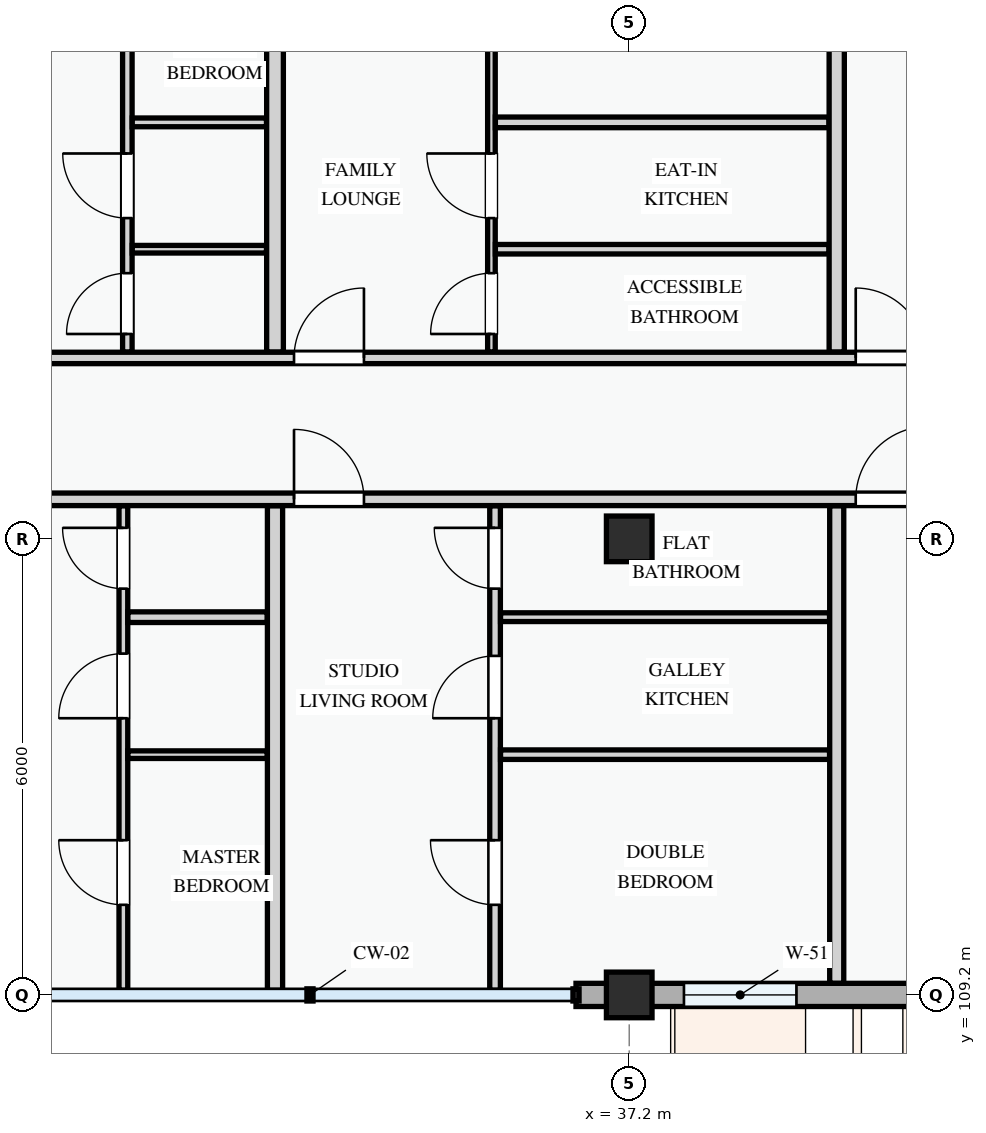
"""IFC4 building model, lengths in metres.
Left out: names, types, materials, properties, quantities, classifications, styles, units other than length and angle.
Written with IfcOpenShell. Run it as: python <this file> out.ifc"""

import sys

from ifc_helpers import new_model, si_unit, direction, frame, frame_2d, origin, origin_2d, place, context, subcontext, project, spatial, rectangle, extrude, element, fill, save


model = new_model("IFC4")
c1 = context("Model", 3, precision=1e-05, world=origin(), true_north=direction((0.0, 1.0)))
c2 = subcontext(c1, "Body", "Model", "MODEL_VIEW")
j1 = project(units=[si_unit("LENGTHUNIT", "METRE"), si_unit("PLANEANGLEUNIT", "RADIAN")], contexts=[c1])
p1 = place(None, origin())
s1 = spatial("IfcSite", under=j1, at=p1, CompositionType="ELEMENT")
p2 = place(p1, origin())
s2 = spatial("IfcBuilding", under=s1, at=p2, CompositionType="ELEMENT")
p3 = place(p2, frame((0.0, 0.0, 24.6)))
s3 = spatial("IfcBuildingStorey", under=s2, at=p3, CompositionType="ELEMENT", Elevation=24.6)
for number, where, z_axis, x_axis in (
    (1, (37.2, 109.2, 0.0), (0.0, 0.0, 1.0), (1.0, 0.0, 0.0)),
    (2, (37.2, 115.2, 0.0), (0.0, 0.0, 1.0), (1.0, 0.0, 0.0)),
):
    element("IfcColumn", number, at=place(p3, frame(where, z_axis=z_axis, x_axis=x_axis)), inside=s3, PredefinedType="COLUMN", context=c2, shape_type="SweptSolid", body=[
        extrude(rectangle(XDim=0.6, YDim=0.6, at=origin_2d()), origin(), (0.0, 0.0, 1.0), 3.3),
    ])
p4 = place(p3, frame((36.5, 109.2, 0.0), z_axis=(0.0, 0.0, 1.0), x_axis=(1.0, 0.0, 0.0)))
e3 = element("IfcWall", 3, at=p4, inside=s3, PredefinedType="STANDARD", context=c2, shape_type="SweptSolid", body=[
    extrude(rectangle(XDim=0.7, YDim=0.305, at=frame_2d((0.35, 0.0))), origin(), (0.0, 0.0, 1.0), 2.375),
])
p5 = place(p3, frame((37.2, 109.2, 0.0), z_axis=(0.0, 0.0, 1.0), x_axis=(1.0, 0.0, 0.0)))
e4 = element("IfcWall", 4, at=p5, inside=s3, PredefinedType="STANDARD", context=c2, shape_type="SweptSolid", body=[
    extrude(rectangle(XDim=6.0, YDim=0.305, at=frame_2d((3.0, 0.0))), origin(), (0.0, 0.0, 1.0), 2.475),
])
p6 = place(p5, frame((0.72, 0.0, 0.78)))
e5 = element("IfcOpeningElement", 5, at=p6, cuts=e4, PredefinedType="OPENING", context=c2, shape_type="SweptSolid", body=[
    extrude(rectangle(XDim=1.48, YDim=1.52, at=frame_2d((0.74, 0.76))), frame((0.0, 0.163, 0.0), z_axis=(0.0, -1.0, 0.0), x_axis=(1.0, 0.0, 0.0)), (0.0, 0.0, 1.0), 0.325),
])
p7 = place(p5, frame((3.72, 0.0, 0.78)))
e6 = element("IfcOpeningElement", 6, at=p7, cuts=e4, PredefinedType="OPENING", context=c2, shape_type="SweptSolid", body=[
    extrude(rectangle(XDim=1.1, YDim=1.3, at=frame_2d((0.55, 0.65))), frame((0.0, 0.163, 0.0), z_axis=(0.0, -1.0, 0.0), x_axis=(1.0, 0.0, 0.0)), (0.0, 0.0, 1.0), 0.325),
])
p8 = place(p3, frame((30.545, 109.26, 0.0), z_axis=(0.0, 0.0, 1.0), x_axis=(0.0, 1.0, 0.0)))
e7 = element("IfcWall", 7, at=p8, inside=s3, PredefinedType="PARTITIONING", context=c2, shape_type="SweptSolid", body=[
    extrude(rectangle(XDim=6.375, YDim=0.115, at=frame_2d((3.188, 0.0))), origin(), (0.0, 0.0, 1.0), 3.0),
])
p9 = place(p8, frame((1.125, 0.0, 0.0)))
e8 = element("IfcOpeningElement", 8, at=p9, cuts=e7, PredefinedType="OPENING", context=c2, shape_type="SweptSolid", body=[
    extrude(rectangle(XDim=0.85, YDim=2.1, at=frame_2d((0.425, 1.05))), frame((0.0, 0.067, 0.0), z_axis=(0.0, -1.0, 0.0), x_axis=(1.0, 0.0, 0.0)), (0.0, 0.0, 1.0), 0.135),
])
p10 = place(p8, frame((3.58, 0.0, 0.0)))
e9 = element("IfcOpeningElement", 9, at=p10, cuts=e7, PredefinedType="OPENING", context=c2, shape_type="SweptSolid", body=[
    extrude(rectangle(XDim=0.85, YDim=2.1, at=frame_2d((0.425, 1.05))), frame((0.0, 0.067, 0.0), z_axis=(0.0, -1.0, 0.0), x_axis=(1.0, 0.0, 0.0)), (0.0, 0.0, 1.0), 0.135),
])
p11 = place(p8, frame((5.285, 0.0, 0.0)))
e10 = element("IfcOpeningElement", 10, at=p11, cuts=e7, PredefinedType="OPENING", context=c2, shape_type="SweptSolid", body=[
    extrude(rectangle(XDim=0.8, YDim=2.1, at=frame_2d((0.4, 1.05))), frame((0.0, 0.067, 0.0), z_axis=(0.0, -1.0, 0.0), x_axis=(1.0, 0.0, 0.0)), (0.0, 0.0, 1.0), 0.135),
])
p12 = place(p3, frame((30.604, 112.361, 0.0), z_axis=(0.0, 0.0, 1.0), x_axis=(1.0, 0.0, 0.0)))
e11 = element("IfcWall", 11, at=p12, inside=s3, PredefinedType="PARTITIONING", context=c2, shape_type="SweptSolid", body=[
    extrude(rectangle(XDim=1.833, YDim=0.1, at=frame_2d((0.917, 0.0))), origin(), (0.0, 0.0, 1.0), 3.0),
])
p13 = place(p3, frame((30.604, 114.17, 0.0), z_axis=(0.0, 0.0, 1.0), x_axis=(1.0, 0.0, 0.0)))
e12 = element("IfcWall", 12, at=p13, inside=s3, PredefinedType="PARTITIONING", context=c2, shape_type="SweptSolid", body=[
    extrude(rectangle(XDim=1.833, YDim=0.14, at=frame_2d((0.917, 0.0))), origin(), (0.0, 0.0, 1.0), 3.0),
])
p14 = place(p3, frame((30.597, 117.657, 0.0), z_axis=(0.0, 0.0, 1.0), x_axis=(0.0, 1.0, 0.0)))
e13 = element("IfcWall", 13, at=p14, inside=s3, PredefinedType="PARTITIONING", context=c2, shape_type="SweptSolid", body=[
    extrude(rectangle(XDim=5.789, YDim=0.125, at=frame_2d((2.894, 0.0))), origin(), (0.0, 0.0, 1.0), 3.0),
])
p15 = place(p14, frame((0.238, 0.0, 0.0)))
e14 = element("IfcOpeningElement", 14, at=p15, cuts=e13, PredefinedType="OPENING", context=c2, shape_type="SweptSolid", body=[
    extrude(rectangle(XDim=0.8, YDim=2.1, at=frame_2d((0.4, 1.05))), frame((0.0, 0.073, 0.0), z_axis=(0.0, -1.0, 0.0), x_axis=(1.0, 0.0, 0.0)), (0.0, 0.0, 1.0), 0.145),
])
p16 = place(p14, frame((1.763, 0.0, 0.0)))
e15 = element("IfcOpeningElement", 15, at=p16, cuts=e13, PredefinedType="OPENING", context=c2, shape_type="SweptSolid", body=[
    extrude(rectangle(XDim=0.85, YDim=2.1, at=frame_2d((0.425, 1.05))), frame((0.0, 0.073, 0.0), z_axis=(0.0, -1.0, 0.0), x_axis=(1.0, 0.0, 0.0)), (0.0, 0.0, 1.0), 0.145),
])
p17 = place(p14, frame((4.028, 0.0, 0.0)))
e16 = element("IfcOpeningElement", 16, at=p17, cuts=e13, PredefinedType="OPENING", context=c2, shape_type="SweptSolid", body=[
    extrude(rectangle(XDim=0.85, YDim=2.1, at=frame_2d((0.425, 1.05))), frame((0.0, 0.073, 0.0), z_axis=(0.0, -1.0, 0.0), x_axis=(1.0, 0.0, 0.0)), (0.0, 0.0, 1.0), 0.145),
])
p18 = place(p3, frame((30.662, 120.679, 0.0), z_axis=(0.0, 0.0, 1.0), x_axis=(1.0, 0.0, 0.0)))
e17 = element("IfcWall", 17, at=p18, inside=s3, PredefinedType="PARTITIONING", context=c2, shape_type="SweptSolid", body=[
    extrude(rectangle(XDim=1.766, YDim=0.115, at=frame_2d((0.883, 0.0))), origin(), (0.0, 0.0, 1.0), 3.0),
])
p19 = place(p3, frame((30.662, 119.01, 0.0), z_axis=(0.0, 0.0, 1.0), x_axis=(1.0, 0.0, 0.0)))
e18 = element("IfcWall", 18, at=p19, inside=s3, PredefinedType="PARTITIONING", context=c2, shape_type="SweptSolid", body=[
    extrude(rectangle(XDim=1.766, YDim=0.1, at=frame_2d((0.883, 0.0))), origin(), (0.0, 0.0, 1.0), 3.0),
])
p20 = place(p3, frame((35.435, 109.26, 0.0), z_axis=(0.0, 0.0, 1.0), x_axis=(0.0, 1.0, 0.0)))
e19 = element("IfcWall", 19, at=p20, inside=s3, PredefinedType="PARTITIONING", context=c2, shape_type="SweptSolid", body=[
    extrude(rectangle(XDim=6.375, YDim=0.14, at=frame_2d((3.188, 0.0))), origin(), (0.0, 0.0, 1.0), 3.0),
])
p21 = place(p20, frame((1.125, 0.0, 0.0)))
e20 = element("IfcOpeningElement", 20, at=p21, cuts=e19, PredefinedType="OPENING", context=c2, shape_type="SweptSolid", body=[
    extrude(rectangle(XDim=0.85, YDim=2.1, at=frame_2d((0.425, 1.05))), frame((0.0, 0.08, 0.0), z_axis=(0.0, -1.0, 0.0), x_axis=(1.0, 0.0, 0.0)), (0.0, 0.0, 1.0), 0.16),
])
p22 = place(p20, frame((3.58, 0.0, 0.0)))
e21 = element("IfcOpeningElement", 21, at=p22, cuts=e19, PredefinedType="OPENING", context=c2, shape_type="SweptSolid", body=[
    extrude(rectangle(XDim=0.82, YDim=2.08, at=frame_2d((0.41, 1.04))), frame((0.0, 0.08, 0.0), z_axis=(0.0, -1.0, 0.0), x_axis=(1.0, 0.0, 0.0)), (0.0, 0.0, 1.0), 0.16),
])
p23 = place(p20, frame((5.285, 0.0, 0.0)))
e22 = element("IfcOpeningElement", 22, at=p23, cuts=e19, PredefinedType="OPENING", context=c2, shape_type="SweptSolid", body=[
    extrude(rectangle(XDim=0.8, YDim=2.1, at=frame_2d((0.4, 1.05))), frame((0.0, 0.08, 0.0), z_axis=(0.0, -1.0, 0.0), x_axis=(1.0, 0.0, 0.0)), (0.0, 0.0, 1.0), 0.16),
])
p24 = place(p3, frame((35.507, 112.361, 0.0), z_axis=(0.0, 0.0, 1.0), x_axis=(1.0, 0.0, 0.0)))
e23 = element("IfcWall", 23, at=p24, inside=s3, PredefinedType="PARTITIONING", context=c2, shape_type="SweptSolid", body=[
    extrude(rectangle(XDim=4.328, YDim=0.125, at=frame_2d((2.164, 0.0))), origin(), (0.0, 0.0, 1.0), 3.0),
])
p25 = place(p3, frame((35.507, 114.17, 0.0), z_axis=(0.0, 0.0, 1.0), x_axis=(1.0, 0.0, 0.0)))
e24 = element("IfcWall", 24, at=p25, inside=s3, PredefinedType="PARTITIONING", context=c2, shape_type="SweptSolid", body=[
    extrude(rectangle(XDim=4.328, YDim=0.115, at=frame_2d((2.164, 0.0))), origin(), (0.0, 0.0, 1.0), 3.0),
])
p26 = place(p3, frame((35.387, 117.657, 0.0), z_axis=(0.0, 0.0, 1.0), x_axis=(0.0, 1.0, 0.0)))
e25 = element("IfcWall", 25, at=p26, inside=s3, PredefinedType="PARTITIONING", context=c2, shape_type="SweptSolid", body=[
    extrude(rectangle(XDim=5.789, YDim=0.1, at=frame_2d((2.894, 0.0))), origin(), (0.0, 0.0, 1.0), 3.0),
])
p27 = place(p26, frame((0.238, 0.0, 0.0)))
e26 = element("IfcOpeningElement", 26, at=p27, cuts=e25, PredefinedType="OPENING", context=c2, shape_type="SweptSolid", body=[
    extrude(rectangle(XDim=0.8, YDim=2.1, at=frame_2d((0.4, 1.05))), frame((0.0, 0.06, 0.0), z_axis=(0.0, -1.0, 0.0), x_axis=(1.0, 0.0, 0.0)), (0.0, 0.0, 1.0), 0.12),
])
p28 = place(p26, frame((1.763, 0.0, 0.0)))
e27 = element("IfcOpeningElement", 27, at=p28, cuts=e25, PredefinedType="OPENING", context=c2, shape_type="SweptSolid", body=[
    extrude(rectangle(XDim=0.85, YDim=2.1, at=frame_2d((0.425, 1.05))), frame((0.0, 0.06, 0.0), z_axis=(0.0, -1.0, 0.0), x_axis=(1.0, 0.0, 0.0)), (0.0, 0.0, 1.0), 0.12),
])
p29 = place(p26, frame((4.028, 0.0, 0.0)))
e28 = element("IfcOpeningElement", 28, at=p29, cuts=e25, PredefinedType="OPENING", context=c2, shape_type="SweptSolid", body=[
    extrude(rectangle(XDim=0.82, YDim=2.08, at=frame_2d((0.41, 1.04))), frame((0.0, 0.06, 0.0), z_axis=(0.0, -1.0, 0.0), x_axis=(1.0, 0.0, 0.0)), (0.0, 0.0, 1.0), 0.12),
])
p30 = place(p3, frame((35.439, 120.679, 0.0), z_axis=(0.0, 0.0, 1.0), x_axis=(1.0, 0.0, 0.0)))
e29 = element("IfcWall", 29, at=p30, inside=s3, PredefinedType="PARTITIONING", context=c2, shape_type="SweptSolid", body=[
    extrude(rectangle(XDim=4.389, YDim=0.14, at=frame_2d((2.194, 0.0))), origin(), (0.0, 0.0, 1.0), 3.0),
])
p31 = place(p3, frame((35.439, 119.01, 0.0), z_axis=(0.0, 0.0, 1.0), x_axis=(1.0, 0.0, 0.0)))
e30 = element("IfcWall", 30, at=p31, inside=s3, PredefinedType="PARTITIONING", context=c2, shape_type="SweptSolid", body=[
    extrude(rectangle(XDim=4.389, YDim=0.125, at=frame_2d((2.194, 0.0))), origin(), (0.0, 0.0, 1.0), 3.0),
])
p32 = place(p3, frame((32.54, 109.26, 0.0), z_axis=(0.0, 0.0, 1.0), x_axis=(0.0, 1.0, 0.0)))
e31 = element("IfcWall", 31, at=p32, inside=s3, PredefinedType="PARTITIONING", context=c2, shape_type="SweptSolid", body=[
    extrude(rectangle(XDim=6.375, YDim=0.2, at=frame_2d((3.188, 0.0))), origin(), (0.0, 0.0, 1.0), 3.0),
])
p33 = place(p3, frame((32.54, 117.657, 0.0), z_axis=(0.0, 0.0, 1.0), x_axis=(0.0, 1.0, 0.0)))
e32 = element("IfcWall", 32, at=p33, inside=s3, PredefinedType="PARTITIONING", context=c2, shape_type="SweptSolid", body=[
    extrude(rectangle(XDim=5.789, YDim=0.22, at=frame_2d((2.894, 0.0))), origin(), (0.0, 0.0, 1.0), 3.0),
])
p34 = place(p3, frame((39.93, 109.354, 0.0), z_axis=(0.0, 0.0, 1.0), x_axis=(0.0, 1.0, 0.0)))
e33 = element("IfcWall", 33, at=p34, inside=s3, PredefinedType="PARTITIONING", context=c2, shape_type="SweptSolid", body=[
    extrude(rectangle(XDim=6.281, YDim=0.185, at=frame_2d((3.141, 0.0))), origin(), (0.0, 0.0, 1.0), 3.0),
])
p35 = place(p3, frame((39.93, 117.657, 0.0), z_axis=(0.0, 0.0, 1.0), x_axis=(0.0, 1.0, 0.0)))
e34 = element("IfcWall", 34, at=p35, inside=s3, PredefinedType="PARTITIONING", context=c2, shape_type="SweptSolid", body=[
    extrude(rectangle(XDim=5.789, YDim=0.2, at=frame_2d((2.894, 0.0))), origin(), (0.0, 0.0, 1.0), 3.0),
])
p36 = place(p3, frame((25.15, 115.72, 0.0), z_axis=(0.0, 0.0, 1.0), x_axis=(1.0, 0.0, 0.0)))
e35 = element("IfcWall", 35, at=p36, inside=s3, PredefinedType="PARTITIONING", context=c2, shape_type="SweptSolid", body=[
    extrude(rectangle(XDim=26.296, YDim=0.165, at=frame_2d((13.148, 0.0))), origin(), (0.0, 0.0, 1.0), 3.0),
])
p37 = place(p36, frame((0.25, 0.0, 0.0)))
e36 = element("IfcOpeningElement", 36, at=p37, cuts=e35, PredefinedType="OPENING", context=c2, shape_type="SweptSolid", body=[
    extrude(rectangle(XDim=0.92, YDim=2.1, at=frame_2d((0.46, 1.05))), frame((0.0, 0.093, 0.0), z_axis=(0.0, -1.0, 0.0), x_axis=(1.0, 0.0, 0.0)), (0.0, 0.0, 1.0), 0.185),
])
p38 = place(p36, frame((7.64, 0.0, 0.0)))
e37 = element("IfcOpeningElement", 37, at=p38, cuts=e35, PredefinedType="OPENING", context=c2, shape_type="SweptSolid", body=[
    extrude(rectangle(XDim=0.92, YDim=2.1, at=frame_2d((0.46, 1.05))), frame((0.0, 0.093, 0.0), z_axis=(0.0, -1.0, 0.0), x_axis=(1.0, 0.0, 0.0)), (0.0, 0.0, 1.0), 0.185),
])
p39 = place(p36, frame((15.03, 0.0, 0.0)))
e38 = element("IfcOpeningElement", 38, at=p39, cuts=e35, PredefinedType="OPENING", context=c2, shape_type="SweptSolid", body=[
    extrude(rectangle(XDim=0.96, YDim=2.12, at=frame_2d((0.48, 1.06))), frame((0.0, 0.093, 0.0), z_axis=(0.0, -1.0, 0.0), x_axis=(1.0, 0.0, 0.0)), (0.0, 0.0, 1.0), 0.185),
])
p40 = place(p3, frame((22.66, 117.58, 0.0), z_axis=(0.0, 0.0, 1.0), x_axis=(1.0, 0.0, 0.0)))
e39 = element("IfcWall", 39, at=p40, inside=s3, PredefinedType="PARTITIONING", context=c2, shape_type="SweptSolid", body=[
    extrude(rectangle(XDim=28.88, YDim=0.15, at=frame_2d((14.44, 0.0))), origin(), (0.0, 0.0, 1.0), 3.0),
])
p41 = place(p40, frame((2.74, 0.0, 0.0)))
e40 = element("IfcOpeningElement", 40, at=p41, cuts=e39, PredefinedType="OPENING", context=c2, shape_type="SweptSolid", body=[
    extrude(rectangle(XDim=0.92, YDim=2.1, at=frame_2d((0.46, 1.05))), frame((0.0, 0.085, 0.0), z_axis=(0.0, -1.0, 0.0), x_axis=(1.0, 0.0, 0.0)), (0.0, 0.0, 1.0), 0.17),
])
p42 = place(p40, frame((10.13, 0.0, 0.0)))
e41 = element("IfcOpeningElement", 41, at=p42, cuts=e39, PredefinedType="OPENING", context=c2, shape_type="SweptSolid", body=[
    extrude(rectangle(XDim=0.92, YDim=2.1, at=frame_2d((0.46, 1.05))), frame((0.0, 0.085, 0.0), z_axis=(0.0, -1.0, 0.0), x_axis=(1.0, 0.0, 0.0)), (0.0, 0.0, 1.0), 0.17),
])
p43 = place(p40, frame((17.52, 0.0, 0.0)))
e42 = element("IfcOpeningElement", 42, at=p43, cuts=e39, PredefinedType="OPENING", context=c2, shape_type="SweptSolid", body=[
    extrude(rectangle(XDim=0.92, YDim=2.1, at=frame_2d((0.46, 1.05))), frame((0.0, 0.085, 0.0), z_axis=(0.0, -1.0, 0.0), x_axis=(1.0, 0.0, 0.0)), (0.0, 0.0, 1.0), 0.17),
])
p44 = place(p6, origin())
e43 = element("IfcWindow", 43, at=p44, inside=s3, PartitioningType="SINGLE_PANEL", PredefinedType="WINDOW", context=c2, shape_type="SweptSolid", body=[
    extrude(rectangle(XDim=1.48, YDim=1.52, at=frame_2d((0.74, 0.76))), frame((0.0, 0.03, 0.0), z_axis=(0.0, -1.0, 0.0), x_axis=(1.0, 0.0, 0.0)), (0.0, 0.0, 1.0), 0.06),
])
fill(e5, e43)
p45 = place(p9, origin())
e44 = element("IfcDoor", 44, at=p45, inside=s3, OperationType="SINGLE_SWING_RIGHT", PredefinedType="DOOR", context=c2, shape_type="SweptSolid", body=[
    extrude(rectangle(XDim=0.85, YDim=2.1, at=frame_2d((0.425, 1.05))), frame((0.0, 0.025, 0.0), z_axis=(0.0, -1.0, 0.0), x_axis=(1.0, 0.0, 0.0)), (0.0, 0.0, 1.0), 0.05),
])
fill(e8, e44)
p46 = place(p10, origin())
e45 = element("IfcDoor", 45, at=p46, inside=s3, OperationType="SINGLE_SWING_LEFT", PredefinedType="DOOR", context=c2, shape_type="SweptSolid", body=[
    extrude(rectangle(XDim=0.85, YDim=2.1, at=frame_2d((0.425, 1.05))), frame((0.0, 0.025, 0.0), z_axis=(0.0, -1.0, 0.0), x_axis=(1.0, 0.0, 0.0)), (0.0, 0.0, 1.0), 0.05),
])
fill(e9, e45)
p47 = place(p11, origin())
e46 = element("IfcDoor", 46, at=p47, inside=s3, OperationType="SINGLE_SWING_RIGHT", PredefinedType="DOOR", context=c2, shape_type="SweptSolid", body=[
    extrude(rectangle(XDim=0.8, YDim=2.1, at=frame_2d((0.4, 1.05))), frame((0.0, 0.025, 0.0), z_axis=(0.0, -1.0, 0.0), x_axis=(1.0, 0.0, 0.0)), (0.0, 0.0, 1.0), 0.05),
])
fill(e10, e46)
p48 = place(p15, origin())
e47 = element("IfcDoor", 47, at=p48, inside=s3, OperationType="SINGLE_SWING_LEFT", PredefinedType="DOOR", context=c2, shape_type="SweptSolid", body=[
    extrude(rectangle(XDim=0.8, YDim=2.1, at=frame_2d((0.4, 1.05))), frame((0.0, 0.025, 0.0), z_axis=(0.0, -1.0, 0.0), x_axis=(1.0, 0.0, 0.0)), (0.0, 0.0, 1.0), 0.05),
])
fill(e14, e47)
p49 = place(p16, origin())
e48 = element("IfcDoor", 48, at=p49, inside=s3, OperationType="SINGLE_SWING_RIGHT", PredefinedType="DOOR", context=c2, shape_type="SweptSolid", body=[
    extrude(rectangle(XDim=0.85, YDim=2.1, at=frame_2d((0.425, 1.05))), frame((0.0, 0.025, 0.0), z_axis=(0.0, -1.0, 0.0), x_axis=(1.0, 0.0, 0.0)), (0.0, 0.0, 1.0), 0.05),
])
fill(e15, e48)
p50 = place(p21, origin())
e49 = element("IfcDoor", 49, at=p50, inside=s3, OperationType="SINGLE_SWING_RIGHT", PredefinedType="DOOR", context=c2, shape_type="SweptSolid", body=[
    extrude(rectangle(XDim=0.85, YDim=2.1, at=frame_2d((0.425, 1.05))), frame((0.0, 0.025, 0.0), z_axis=(0.0, -1.0, 0.0), x_axis=(1.0, 0.0, 0.0)), (0.0, 0.0, 1.0), 0.05),
])
fill(e20, e49)
p51 = place(p22, origin())
e50 = element("IfcDoor", 50, at=p51, inside=s3, OperationType="SINGLE_SWING_LEFT", PredefinedType="DOOR", context=c2, shape_type="SweptSolid", body=[
    extrude(rectangle(XDim=0.82, YDim=2.08, at=frame_2d((0.41, 1.04))), frame((0.0, 0.025, 0.0), z_axis=(0.0, -1.0, 0.0), x_axis=(1.0, 0.0, 0.0)), (0.0, 0.0, 1.0), 0.05),
])
fill(e21, e50)
p52 = place(p23, origin())
e51 = element("IfcDoor", 51, at=p52, inside=s3, OperationType="SINGLE_SWING_RIGHT", PredefinedType="DOOR", context=c2, shape_type="SweptSolid", body=[
    extrude(rectangle(XDim=0.8, YDim=2.1, at=frame_2d((0.4, 1.05))), frame((0.0, 0.025, 0.0), z_axis=(0.0, -1.0, 0.0), x_axis=(1.0, 0.0, 0.0)), (0.0, 0.0, 1.0), 0.05),
])
fill(e22, e51)
p53 = place(p27, origin())
e52 = element("IfcDoor", 52, at=p53, inside=s3, OperationType="SINGLE_SWING_LEFT", PredefinedType="DOOR", context=c2, shape_type="SweptSolid", body=[
    extrude(rectangle(XDim=0.8, YDim=2.1, at=frame_2d((0.4, 1.05))), frame((0.0, 0.025, 0.0), z_axis=(0.0, -1.0, 0.0), x_axis=(1.0, 0.0, 0.0)), (0.0, 0.0, 1.0), 0.05),
])
fill(e26, e52)
p54 = place(p28, origin())
e53 = element("IfcDoor", 53, at=p54, inside=s3, OperationType="SINGLE_SWING_RIGHT", PredefinedType="DOOR", context=c2, shape_type="SweptSolid", body=[
    extrude(rectangle(XDim=0.85, YDim=2.1, at=frame_2d((0.425, 1.05))), frame((0.0, 0.025, 0.0), z_axis=(0.0, -1.0, 0.0), x_axis=(1.0, 0.0, 0.0)), (0.0, 0.0, 1.0), 0.05),
])
fill(e27, e53)
p55 = place(p38, origin())
e54 = element("IfcDoor", 54, at=p55, inside=s3, OperationType="SINGLE_SWING_LEFT", PredefinedType="DOOR", context=c2, shape_type="SweptSolid", body=[
    extrude(rectangle(XDim=0.92, YDim=2.1, at=frame_2d((0.46, 1.05))), frame((0.0, 0.025, 0.0), z_axis=(0.0, -1.0, 0.0), x_axis=(1.0, 0.0, 0.0)), (0.0, 0.0, 1.0), 0.05),
])
fill(e37, e54)
p56 = place(p39, origin())
e55 = element("IfcDoor", 55, at=p56, inside=s3, OperationType="SINGLE_SWING_RIGHT", PredefinedType="DOOR", context=c2, shape_type="SweptSolid", body=[
    extrude(rectangle(XDim=0.96, YDim=2.12, at=frame_2d((0.48, 1.06))), frame((0.0, 0.025, 0.0), z_axis=(0.0, -1.0, 0.0), x_axis=(1.0, 0.0, 0.0)), (0.0, 0.0, 1.0), 0.05),
])
fill(e38, e55)
p57 = place(p42, origin())
e56 = element("IfcDoor", 56, at=p57, inside=s3, OperationType="SINGLE_SWING_RIGHT", PredefinedType="DOOR", context=c2, shape_type="SweptSolid", body=[
    extrude(rectangle(XDim=0.92, YDim=2.1, at=frame_2d((0.46, 1.05))), frame((0.0, 0.025, 0.0), z_axis=(0.0, -1.0, 0.0), x_axis=(1.0, 0.0, 0.0)), (0.0, 0.0, 1.0), 0.05),
])
fill(e41, e56)
p58 = place(p43, origin())
e57 = element("IfcDoor", 57, at=p58, inside=s3, OperationType="SINGLE_SWING_LEFT", PredefinedType="DOOR", context=c2, shape_type="SweptSolid", body=[
    extrude(rectangle(XDim=0.92, YDim=2.1, at=frame_2d((0.46, 1.05))), frame((0.0, 0.025, 0.0), z_axis=(0.0, -1.0, 0.0), x_axis=(1.0, 0.0, 0.0)), (0.0, 0.0, 1.0), 0.05),
])
fill(e42, e57)
save(model, sys.argv[1])
